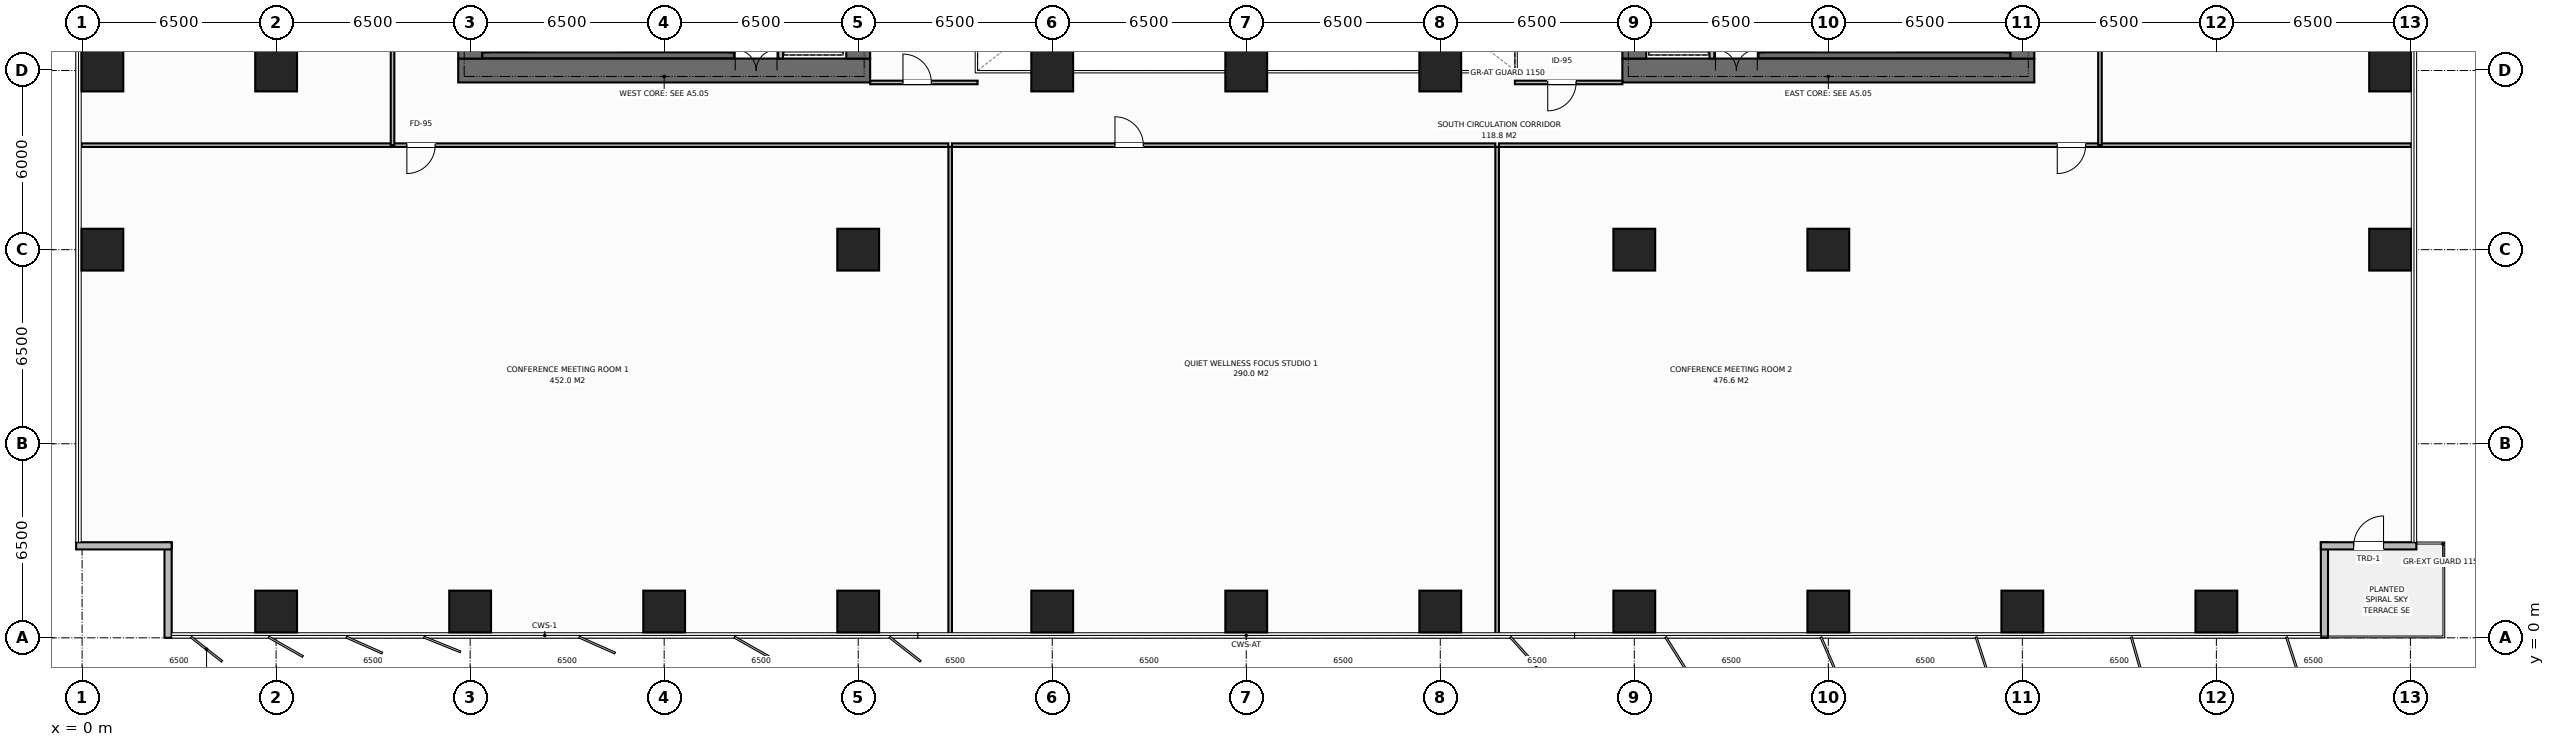
"""IFC4 building model, lengths in metres.
Left out: names, types, materials, properties, quantities, classifications, styles, units other than length and angle.
Written with IfcOpenShell. Run it as: python <this file> out.ifc"""

import sys

from ifc_helpers import new_model, si_unit, direction, frame, frame_2d, origin, origin_2d, place, context, subcontext, project, spatial, rectangle, extrude, element, fill, save


model = new_model("IFC4")
c1 = context("Model", 3, precision=1e-05, world=origin(), true_north=direction((0.0, 1.0)))
c2 = subcontext(c1, "Body", "Model", "MODEL_VIEW")
j1 = project(units=[si_unit("LENGTHUNIT", "METRE"), si_unit("PLANEANGLEUNIT", "RADIAN")], contexts=[c1])
p1 = place(None, origin())
s1 = spatial("IfcSite", under=j1, at=p1, CompositionType="ELEMENT")
p2 = place(p1, origin())
s2 = spatial("IfcBuilding", under=s1, at=p2, CompositionType="ELEMENT")
p3 = place(p2, frame((0.0, 0.0, 54.4)))
s3 = spatial("IfcBuildingStorey", under=s2, at=p3, CompositionType="ELEMENT", Elevation=54.4)
p4 = place(p3, frame((12.6, 19.0, 0.0), z_axis=(0.0, 0.0, 1.0), x_axis=(1.0, 0.0, 0.0)))
e1 = element("IfcWall", 1, at=p4, inside=s3, PredefinedType="SHEAR", context=c2, shape_type="SweptSolid", body=[
    extrude(rectangle(XDim=13.8, YDim=0.8, at=frame_2d((6.9, 0.0))), origin(), (0.0, 0.0, 1.0), 3.8),
])
p5 = place(p4, frame((9.28, 0.0, 0.0)))
e2 = element("IfcOpeningElement", 2, at=p5, cuts=e1, PredefinedType="OPENING", context=c2, shape_type="SweptSolid", body=[
    extrude(rectangle(XDim=1.4, YDim=2.2, at=frame_2d((0.7, 1.1))), frame((0.0, 0.41, 0.0), z_axis=(0.0, -1.0, 0.0), x_axis=(1.0, 0.0, 0.0)), (0.0, 0.0, 1.0), 0.82),
])
p6 = place(p3, frame((13.0, 19.4, 0.0), z_axis=(0.0, 0.0, 1.0), x_axis=(0.0, 1.0, 0.0)))
e3 = element("IfcWall", 3, at=p6, inside=s3, PredefinedType="SHEAR", context=c2, shape_type="SweptSolid", body=[
    extrude(rectangle(XDim=13.2, YDim=0.8, at=frame_2d((6.6, 0.0))), origin(), (0.0, 0.0, 1.0), 3.8),
])
p7 = place(p6, frame((4.65, 0.0, 0.0)))
e4 = element("IfcOpeningElement", 4, at=p7, cuts=e3, PredefinedType="OPENING", context=c2, shape_type="SweptSolid", body=[
    extrude(rectangle(XDim=1.4, YDim=2.2, at=frame_2d((0.7, 1.1))), frame((0.0, 0.41, 0.0), z_axis=(0.0, -1.0, 0.0), x_axis=(1.0, 0.0, 0.0)), (0.0, 0.0, 1.0), 0.82),
])
p8 = place(p3, frame((26.0, 19.4, 0.0), z_axis=(0.0, 0.0, 1.0), x_axis=(0.0, 1.0, 0.0)))
e5 = element("IfcWall", 5, at=p8, inside=s3, PredefinedType="SHEAR", context=c2, shape_type="SweptSolid", body=[
    extrude(rectangle(XDim=13.2, YDim=0.8, at=frame_2d((6.6, 0.0))), origin(), (0.0, 0.0, 1.0), 3.8),
])
p9 = place(p3, frame((51.6, 19.0, 0.0), z_axis=(0.0, 0.0, 1.0), x_axis=(1.0, 0.0, 0.0)))
e6 = element("IfcWall", 6, at=p9, inside=s3, PredefinedType="SHEAR", context=c2, shape_type="SweptSolid", body=[
    extrude(rectangle(XDim=13.8, YDim=0.8, at=frame_2d((6.9, 0.0))), origin(), (0.0, 0.0, 1.0), 3.8),
])
p10 = place(p9, frame((3.12, 0.0, 0.0)))
e7 = element("IfcOpeningElement", 7, at=p10, cuts=e6, PredefinedType="OPENING", context=c2, shape_type="SweptSolid", body=[
    extrude(rectangle(XDim=1.4, YDim=2.2, at=frame_2d((0.7, 1.1))), frame((0.0, 0.41, 0.0), z_axis=(0.0, -1.0, 0.0), x_axis=(1.0, 0.0, 0.0)), (0.0, 0.0, 1.0), 0.82),
])
p11 = place(p3, frame((52.0, 19.4, 0.0), z_axis=(0.0, 0.0, 1.0), x_axis=(0.0, 1.0, 0.0)))
e8 = element("IfcWall", 8, at=p11, inside=s3, PredefinedType="SHEAR", context=c2, shape_type="SweptSolid", body=[
    extrude(rectangle(XDim=13.2, YDim=0.8, at=frame_2d((6.6, 0.0))), origin(), (0.0, 0.0, 1.0), 3.8),
])
p12 = place(p3, frame((65.0, 19.4, 0.0), z_axis=(0.0, 0.0, 1.0), x_axis=(0.0, 1.0, 0.0)))
e9 = element("IfcWall", 9, at=p12, inside=s3, PredefinedType="SHEAR", context=c2, shape_type="SweptSolid", body=[
    extrude(rectangle(XDim=13.2, YDim=0.8, at=frame_2d((6.6, 0.0))), origin(), (0.0, 0.0, 1.0), 3.8),
])
p13 = place(p12, frame((8.05, 0.0, 0.0)))
e10 = element("IfcOpeningElement", 10, at=p13, cuts=e9, PredefinedType="OPENING", context=c2, shape_type="SweptSolid", body=[
    extrude(rectangle(XDim=1.3, YDim=2.2, at=frame_2d((0.65, 1.1))), frame((0.0, 0.41, 0.0), z_axis=(0.0, -1.0, 0.0), x_axis=(1.0, 0.0, 0.0)), (0.0, 0.0, 1.0), 0.82),
])
for number, where, z_axis, x_axis in (
    (11, (13.41, 19.51, 0.0), (0.0, 0.0, 1.0), (1.0, 0.0, 0.0)),
    (12, (56.16, 19.51, 0.0), (0.0, 0.0, 1.0), (1.0, 0.0, 0.0)),
):
    element("IfcWall", number, at=place(p3, frame(where, z_axis=z_axis, x_axis=x_axis)), inside=s3, PredefinedType="SHEAR", context=c2, shape_type="SweptSolid", body=[
        extrude(rectangle(XDim=8.43, YDim=0.2, at=frame_2d((4.215, 0.0))), origin(), (0.0, 0.0, 1.0), 3.8),
    ])
for number, where, z_axis, x_axis in (
    (13, (58.5, 13.0, 0.0), (0.0, 0.0, 1.0), (1.0, 0.0, 0.0)),
    (14, (6.5, 19.0, 0.0), (0.0, 0.0, 1.0), (1.0, 0.0, 0.0)),
    (15, (32.5, 19.0, 0.0), (0.0, 0.0, 1.0), (1.0, 0.0, 0.0)),
    (16, (39.0, 19.0, 0.0), (0.0, 0.0, 1.0), (1.0, 0.0, 0.0)),
    (17, (45.5, 19.0, 0.0), (0.0, 0.0, 1.0), (1.0, 0.0, 0.0)),
    (18, (26.0, 13.0, 0.0), (0.0, 0.0, 1.0), (1.0, 0.0, 0.0)),
    (19, (52.0, 13.0, 0.0), (0.0, 0.0, 1.0), (1.0, 0.0, 0.0)),
    (20, (6.5, 0.88, 0.0), (0.0, 0.0, 1.0), (1.0, 0.0, 0.0)),
    (21, (13.0, 0.88, 0.0), (0.0, 0.0, 1.0), (1.0, 0.0, 0.0)),
    (22, (19.5, 0.88, 0.0), (0.0, 0.0, 1.0), (1.0, 0.0, 0.0)),
    (23, (26.0, 0.88, 0.0), (0.0, 0.0, 1.0), (1.0, 0.0, 0.0)),
    (24, (32.5, 0.88, 0.0), (0.0, 0.0, 1.0), (1.0, 0.0, 0.0)),
    (25, (39.0, 0.88, 0.0), (0.0, 0.0, 1.0), (1.0, 0.0, 0.0)),
    (26, (45.5, 0.88, 0.0), (0.0, 0.0, 1.0), (1.0, 0.0, 0.0)),
    (27, (52.0, 0.88, 0.0), (0.0, 0.0, 1.0), (1.0, 0.0, 0.0)),
    (28, (58.5, 0.88, 0.0), (0.0, 0.0, 1.0), (1.0, 0.0, 0.0)),
    (29, (65.0, 0.88, 0.0), (0.0, 0.0, 1.0), (1.0, 0.0, 0.0)),
    (30, (71.5, 0.88, 0.0), (0.0, 0.0, 1.0), (1.0, 0.0, 0.0)),
    (31, (0.68, 13.0, 0.0), (0.0, 0.0, 1.0), (1.0, 0.0, 0.0)),
    (32, (77.32, 13.0, 0.0), (0.0, 0.0, 1.0), (1.0, 0.0, 0.0)),
    (33, (0.68, 19.0, 0.0), (0.0, 0.0, 1.0), (1.0, 0.0, 0.0)),
    (34, (77.32, 19.0, 0.0), (0.0, 0.0, 1.0), (1.0, 0.0, 0.0)),
):
    element("IfcColumn", number, at=place(p3, frame(where, z_axis=z_axis, x_axis=x_axis)), inside=s3, PredefinedType="COLUMN", context=c2, shape_type="SweptSolid", body=[
        extrude(rectangle(XDim=1.4, YDim=1.4, at=origin_2d()), origin(), (0.0, 0.0, 1.0), 3.8),
    ])
for number, where, z_axis, x_axis in (
    (35, (2.88, 0.0, 0.0), (0.0, 0.0, 1.0), (0.0, 1.0, 0.0)),
    (36, (3.0, 3.08, 0.0), (0.0, 0.0, 1.0), (-1.0, 0.0, 0.0)),
    (37, (75.12, 3.2, 0.0), (0.0, 0.0, 1.0), (0.0, -1.0, 0.0)),
):
    element("IfcWall", number, at=place(p3, frame(where, z_axis=z_axis, x_axis=x_axis)), inside=s3, PredefinedType="STANDARD", context=c2, shape_type="SweptSolid", body=[
        extrude(rectangle(XDim=3.2, YDim=0.24, at=frame_2d((1.6, 0.0))), origin(), (0.0, 0.0, 1.0), 3.55),
    ])
p14 = place(p3, frame((78.2, 3.08, 0.0), z_axis=(0.0, 0.0, 1.0), x_axis=(-1.0, 0.0, 0.0)))
e38 = element("IfcWall", 38, at=p14, inside=s3, PredefinedType="STANDARD", context=c2, shape_type="SweptSolid", body=[
    extrude(rectangle(XDim=3.2, YDim=0.24, at=frame_2d((1.6, 0.0))), origin(), (0.0, 0.0, 1.0), 3.55),
])
p15 = place(p14, frame((1.1, 0.0, 0.0)))
e39 = element("IfcOpeningElement", 39, at=p15, cuts=e38, PredefinedType="OPENING", context=c2, shape_type="SweptSolid", body=[
    extrude(rectangle(XDim=1.0, YDim=2.2, at=frame_2d((0.5, 1.1))), frame((0.0, 0.13, 0.0), z_axis=(0.0, -1.0, 0.0), x_axis=(1.0, 0.0, 0.0)), (0.0, 0.0, 1.0), 0.26),
])
p16 = place(p3, frame((23.4, 19.4, 0.0), z_axis=(0.0, 0.0, 1.0), x_axis=(0.0, 1.0, 0.0)))
e40 = element("IfcWall", 40, at=p16, inside=s3, PredefinedType="STANDARD", context=c2, shape_type="SweptSolid", body=[
    extrude(rectangle(XDim=13.2, YDim=0.16, at=frame_2d((6.6, 0.0))), origin(), (0.0, 0.0, 1.0), 3.55),
])
p17 = place(p16, frame((0.55, 0.0, 0.0)))
e41 = element("IfcOpeningElement", 41, at=p17, cuts=e40, PredefinedType="OPENING", context=c2, shape_type="SweptSolid", body=[
    extrude(rectangle(XDim=1.1, YDim=2.2, at=frame_2d((0.55, 1.1))), frame((0.0, 0.09, 0.0), z_axis=(0.0, -1.0, 0.0), x_axis=(1.0, 0.0, 0.0)), (0.0, 0.0, 1.0), 0.18),
])
p18 = place(p16, frame((2.7, 0.0, 0.0)))
e42 = element("IfcOpeningElement", 42, at=p18, cuts=e40, PredefinedType="OPENING", context=c2, shape_type="SweptSolid", body=[
    extrude(rectangle(XDim=1.1, YDim=2.2, at=frame_2d((0.55, 1.1))), frame((0.0, 0.09, 0.0), z_axis=(0.0, -1.0, 0.0), x_axis=(1.0, 0.0, 0.0)), (0.0, 0.0, 1.0), 0.18),
])
p19 = place(p3, frame((54.6, 19.4, 0.0), z_axis=(0.0, 0.0, 1.0), x_axis=(0.0, 1.0, 0.0)))
e43 = element("IfcWall", 43, at=p19, inside=s3, PredefinedType="STANDARD", context=c2, shape_type="SweptSolid", body=[
    extrude(rectangle(XDim=13.2, YDim=0.16, at=frame_2d((6.6, 0.0))), origin(), (0.0, 0.0, 1.0), 3.55),
])
p20 = place(p19, frame((0.55, 0.0, 0.0)))
e44 = element("IfcOpeningElement", 44, at=p20, cuts=e43, PredefinedType="OPENING", context=c2, shape_type="SweptSolid", body=[
    extrude(rectangle(XDim=1.1, YDim=2.2, at=frame_2d((0.55, 1.1))), frame((0.0, 0.09, 0.0), z_axis=(0.0, -1.0, 0.0), x_axis=(1.0, 0.0, 0.0)), (0.0, 0.0, 1.0), 0.18),
])
p21 = place(p19, frame((2.7, 0.0, 0.0)))
e45 = element("IfcOpeningElement", 45, at=p21, cuts=e43, PredefinedType="OPENING", context=c2, shape_type="SweptSolid", body=[
    extrude(rectangle(XDim=1.1, YDim=2.2, at=frame_2d((0.55, 1.1))), frame((0.0, 0.09, 0.0), z_axis=(0.0, -1.0, 0.0), x_axis=(1.0, 0.0, 0.0)), (0.0, 0.0, 1.0), 0.18),
])
p22 = place(p3, frame((26.4, 18.6, 0.0), z_axis=(0.0, 0.0, 1.0), x_axis=(1.0, 0.0, 0.0)))
e46 = element("IfcWall", 46, at=p22, inside=s3, PredefinedType="PARTITIONING", context=c2, shape_type="SweptSolid", body=[
    extrude(rectangle(XDim=3.6, YDim=0.12, at=frame_2d((1.8, 0.0))), origin(), (0.0, 0.0, 1.0), 3.55),
])
p23 = place(p22, frame((1.1, 0.0, 0.0)))
e47 = element("IfcOpeningElement", 47, at=p23, cuts=e46, PredefinedType="OPENING", context=c2, shape_type="SweptSolid", body=[
    extrude(rectangle(XDim=0.95, YDim=2.15, at=frame_2d((0.475, 1.075))), frame((0.0, 0.07, 0.0), z_axis=(0.0, -1.0, 0.0), x_axis=(1.0, 0.0, 0.0)), (0.0, 0.0, 1.0), 0.14),
])
p24 = place(p3, frame((48.0, 18.6, 0.0), z_axis=(0.0, 0.0, 1.0), x_axis=(1.0, 0.0, 0.0)))
e48 = element("IfcWall", 48, at=p24, inside=s3, PredefinedType="PARTITIONING", context=c2, shape_type="SweptSolid", body=[
    extrude(rectangle(XDim=3.6, YDim=0.12, at=frame_2d((1.8, 0.0))), origin(), (0.0, 0.0, 1.0), 3.55),
])
p25 = place(p24, frame((1.1, 0.0, 0.0)))
e49 = element("IfcOpeningElement", 49, at=p25, cuts=e48, PredefinedType="OPENING", context=c2, shape_type="SweptSolid", body=[
    extrude(rectangle(XDim=0.95, YDim=2.15, at=frame_2d((0.475, 1.075))), frame((0.0, 0.07, 0.0), z_axis=(0.0, -1.0, 0.0), x_axis=(1.0, 0.0, 0.0)), (0.0, 0.0, 1.0), 0.14),
])
p26 = place(p3, frame((29.081, 0.02, 0.0), z_axis=(0.0, 0.0, 1.0), x_axis=(0.0, 1.0, 0.0)))
e50 = element("IfcWall", 50, at=p26, inside=s3, PredefinedType="PARTITIONING", context=c2, shape_type="SweptSolid", body=[
    extrude(rectangle(XDim=16.42, YDim=0.12, at=frame_2d((8.21, 0.0))), origin(), (0.0, 0.0, 1.0), 3.55),
])
p27 = place(p3, frame((-0.02, 16.5, 0.0), z_axis=(0.0, 0.0, 1.0), x_axis=(1.0, 0.0, 0.0)))
e51 = element("IfcWall", 51, at=p27, inside=s3, PredefinedType="PARTITIONING", context=c2, shape_type="SweptSolid", body=[
    extrude(rectangle(XDim=29.041, YDim=0.12, at=frame_2d((14.521, 0.0))), origin(), (0.0, 0.0, 1.0), 3.55),
])
p28 = place(p27, frame((10.9, 0.0, 0.0)))
e52 = element("IfcOpeningElement", 52, at=p28, cuts=e51, PredefinedType="OPENING", context=c2, shape_type="SweptSolid", body=[
    extrude(rectangle(XDim=0.95, YDim=2.15, at=frame_2d((0.475, 1.075))), frame((0.0, 0.07, 0.0), z_axis=(0.0, -1.0, 0.0), x_axis=(1.0, 0.0, 0.0)), (0.0, 0.0, 1.0), 0.14),
])
p29 = place(p3, frame((47.405, 0.02, 0.0), z_axis=(0.0, 0.0, 1.0), x_axis=(0.0, 1.0, 0.0)))
e53 = element("IfcWall", 53, at=p29, inside=s3, PredefinedType="PARTITIONING", context=c2, shape_type="SweptSolid", body=[
    extrude(rectangle(XDim=16.42, YDim=0.12, at=frame_2d((8.21, 0.0))), origin(), (0.0, 0.0, 1.0), 3.55),
])
p30 = place(p3, frame((29.141, 16.5, 0.0), z_axis=(0.0, 0.0, 1.0), x_axis=(1.0, 0.0, 0.0)))
e54 = element("IfcWall", 54, at=p30, inside=s3, PredefinedType="PARTITIONING", context=c2, shape_type="SweptSolid", body=[
    extrude(rectangle(XDim=18.204, YDim=0.12, at=frame_2d((9.102, 0.0))), origin(), (0.0, 0.0, 1.0), 3.55),
])
p31 = place(p30, frame((5.461, 0.0, 0.0)))
e55 = element("IfcOpeningElement", 55, at=p31, cuts=e54, PredefinedType="OPENING", context=c2, shape_type="SweptSolid", body=[
    extrude(rectangle(XDim=0.95, YDim=2.15, at=frame_2d((0.475, 1.075))), frame((0.0, 0.07, 0.0), z_axis=(0.0, -1.0, 0.0), x_axis=(1.0, 0.0, 0.0)), (0.0, 0.0, 1.0), 0.14),
])
p32 = place(p3, frame((47.465, 16.5, 0.0), z_axis=(0.0, 0.0, 1.0), x_axis=(1.0, 0.0, 0.0)))
e56 = element("IfcWall", 56, at=p32, inside=s3, PredefinedType="PARTITIONING", context=c2, shape_type="SweptSolid", body=[
    extrude(rectangle(XDim=30.555, YDim=0.12, at=frame_2d((15.278, 0.0))), origin(), (0.0, 0.0, 1.0), 3.55),
])
p33 = place(p32, frame((18.705, 0.0, 0.0)))
e57 = element("IfcOpeningElement", 57, at=p33, cuts=e56, PredefinedType="OPENING", context=c2, shape_type="SweptSolid", body=[
    extrude(rectangle(XDim=0.95, YDim=2.15, at=frame_2d((0.475, 1.075))), frame((0.0, 0.07, 0.0), z_axis=(0.0, -1.0, 0.0), x_axis=(1.0, 0.0, 0.0)), (0.0, 0.0, 1.0), 0.14),
])
p34 = place(p3, frame((10.4, 16.5, 0.0), z_axis=(0.0, 0.0, 1.0), x_axis=(0.0, 1.0, 0.0)))
e58 = element("IfcWall", 58, at=p34, inside=s3, PredefinedType="PARTITIONING", context=c2, shape_type="SweptSolid", body=[
    extrude(rectangle(XDim=6.333, YDim=0.12, at=frame_2d((3.167, 0.0))), origin(), (0.0, 0.0, 1.0), 3.55),
])
p35 = place(p34, frame((3.742, 0.0, 0.0)))
e59 = element("IfcOpeningElement", 59, at=p35, cuts=e58, PredefinedType="OPENING", context=c2, shape_type="SweptSolid", body=[
    extrude(rectangle(XDim=0.95, YDim=2.15, at=frame_2d((0.475, 1.075))), frame((0.0, 0.07, 0.0), z_axis=(0.0, -1.0, 0.0), x_axis=(1.0, 0.0, 0.0)), (0.0, 0.0, 1.0), 0.14),
])
p36 = place(p3, frame((67.6, 16.5, 0.0), z_axis=(0.0, 0.0, 1.0), x_axis=(0.0, 1.0, 0.0)))
e60 = element("IfcWall", 60, at=p36, inside=s3, PredefinedType="PARTITIONING", context=c2, shape_type="SweptSolid", body=[
    extrude(rectangle(XDim=19.0, YDim=0.12, at=frame_2d((9.5, 0.0))), origin(), (0.0, 0.0, 1.0), 3.55),
])
p37 = place(p36, frame((9.025, 0.0, 0.0)))
e61 = element("IfcOpeningElement", 61, at=p37, cuts=e60, PredefinedType="OPENING", context=c2, shape_type="SweptSolid", body=[
    extrude(rectangle(XDim=0.95, YDim=2.15, at=frame_2d((0.475, 1.075))), frame((0.0, 0.07, 0.0), z_axis=(0.0, -1.0, 0.0), x_axis=(1.0, 0.0, 0.0)), (0.0, 0.0, 1.0), 0.14),
])
p38 = place(p15, origin())
e62 = element("IfcDoor", 62, at=p38, inside=s3, OperationType="SINGLE_SWING_RIGHT", PredefinedType="DOOR", context=c2, shape_type="SweptSolid", body=[
    extrude(rectangle(XDim=1.0, YDim=2.2, at=frame_2d((0.5, 1.1))), frame((0.0, 0.025, 0.0), z_axis=(0.0, -1.0, 0.0), x_axis=(1.0, 0.0, 0.0)), (0.0, 0.0, 1.0), 0.05),
])
fill(e39, e62)
p39 = place(p5, origin())
e63 = element("IfcDoor", 63, at=p39, inside=s3, OperationType="DOUBLE_DOOR_SINGLE_SWING", PredefinedType="DOOR", context=c2, shape_type="SweptSolid", body=[
    extrude(rectangle(XDim=1.4, YDim=2.2, at=frame_2d((0.7, 1.1))), frame((0.0, 0.125, 0.0), z_axis=(0.0, -1.0, 0.0), x_axis=(1.0, 0.0, 0.0)), (0.0, 0.0, 1.0), 0.05),
])
fill(e2, e63)
p40 = place(p10, origin())
e64 = element("IfcDoor", 64, at=p40, inside=s3, OperationType="DOUBLE_DOOR_SINGLE_SWING", PredefinedType="DOOR", context=c2, shape_type="SweptSolid", body=[
    extrude(rectangle(XDim=1.4, YDim=2.2, at=frame_2d((0.7, 1.1))), frame((0.0, 0.125, 0.0), z_axis=(0.0, -1.0, 0.0), x_axis=(1.0, 0.0, 0.0)), (0.0, 0.0, 1.0), 0.05),
])
fill(e7, e64)
p41 = place(p23, origin())
e65 = element("IfcDoor", 65, at=p41, inside=s3, OperationType="SINGLE_SWING_LEFT", PredefinedType="DOOR", context=c2, shape_type="SweptSolid", body=[
    extrude(rectangle(XDim=0.95, YDim=2.15, at=frame_2d((0.475, 1.075))), frame((0.0, 0.025, 0.0), z_axis=(0.0, -1.0, 0.0), x_axis=(1.0, 0.0, 0.0)), (0.0, 0.0, 1.0), 0.05),
])
fill(e47, e65)
p42 = place(p25, origin())
e66 = element("IfcDoor", 66, at=p42, inside=s3, OperationType="SINGLE_SWING_RIGHT", PredefinedType="DOOR", context=c2, shape_type="SweptSolid", body=[
    extrude(rectangle(XDim=0.95, YDim=2.15, at=frame_2d((0.475, 1.075))), frame((0.0, 0.025, 0.0), z_axis=(0.0, -1.0, 0.0), x_axis=(1.0, 0.0, 0.0)), (0.0, 0.0, 1.0), 0.05),
])
fill(e49, e66)
p43 = place(p28, origin())
e67 = element("IfcDoor", 67, at=p43, inside=s3, OperationType="SINGLE_SWING_RIGHT", PredefinedType="DOOR", context=c2, shape_type="SweptSolid", body=[
    extrude(rectangle(XDim=0.95, YDim=2.15, at=frame_2d((0.475, 1.075))), frame((0.0, 0.025, 0.0), z_axis=(0.0, -1.0, 0.0), x_axis=(1.0, 0.0, 0.0)), (0.0, 0.0, 1.0), 0.05),
])
fill(e52, e67)
p44 = place(p31, origin())
e68 = element("IfcDoor", 68, at=p44, inside=s3, OperationType="SINGLE_SWING_LEFT", PredefinedType="DOOR", context=c2, shape_type="SweptSolid", body=[
    extrude(rectangle(XDim=0.95, YDim=2.15, at=frame_2d((0.475, 1.075))), frame((0.0, 0.025, 0.0), z_axis=(0.0, -1.0, 0.0), x_axis=(1.0, 0.0, 0.0)), (0.0, 0.0, 1.0), 0.05),
])
fill(e55, e68)
p45 = place(p33, origin())
e69 = element("IfcDoor", 69, at=p45, inside=s3, OperationType="SINGLE_SWING_RIGHT", PredefinedType="DOOR", context=c2, shape_type="SweptSolid", body=[
    extrude(rectangle(XDim=0.95, YDim=2.15, at=frame_2d((0.475, 1.075))), frame((0.0, 0.025, 0.0), z_axis=(0.0, -1.0, 0.0), x_axis=(1.0, 0.0, 0.0)), (0.0, 0.0, 1.0), 0.05),
])
fill(e57, e69)
save(model, sys.argv[1])
